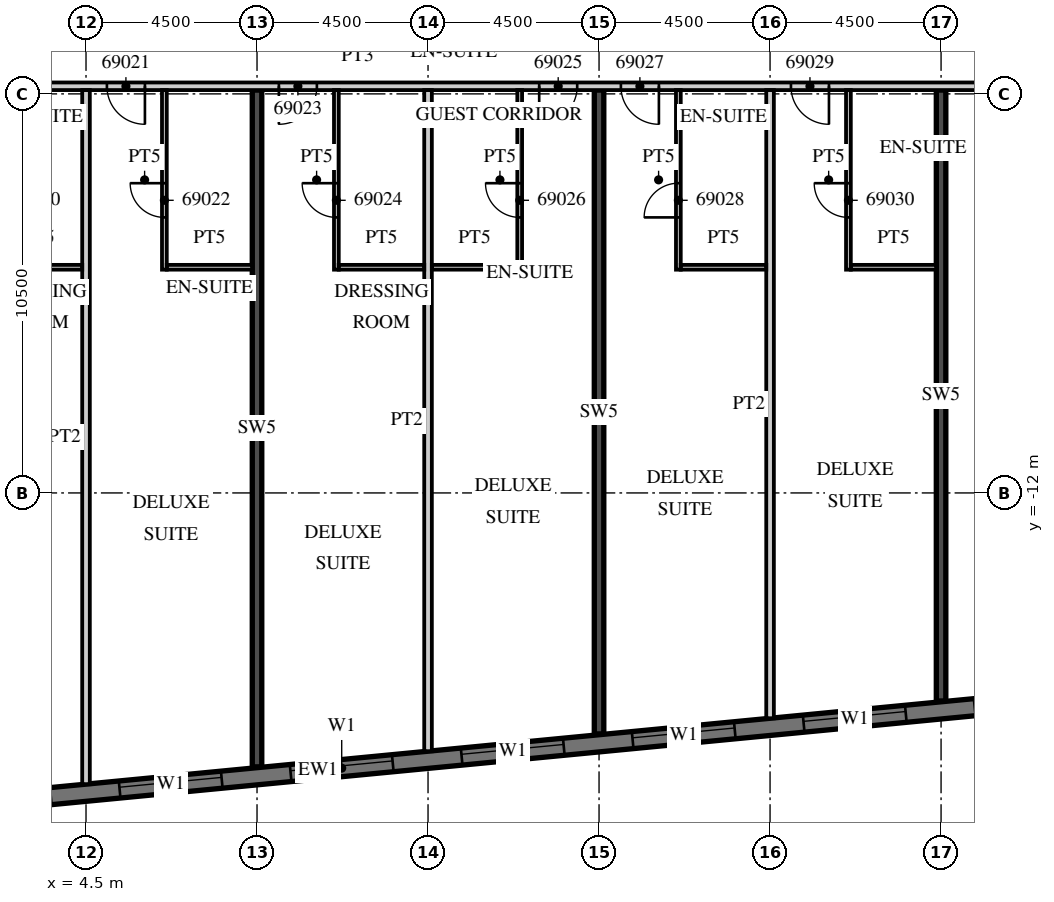
"""IFC4 building model, lengths in metres.
Left out: names, types, materials, properties, quantities, classifications, styles, units other than length and angle.
Written with IfcOpenShell. Run it as: python <this file> out.ifc"""

import sys

from ifc_helpers import new_model, si_unit, direction, frame, frame_2d, origin, place, context, subcontext, project, spatial, rectangle, extrude, element, fill, save


model = new_model("IFC4")
c1 = context("Model", 3, precision=1e-05, world=origin(), true_north=direction((0.0, 1.0)))
c2 = subcontext(c1, "Body", "Model", "MODEL_VIEW")
j1 = project(units=[si_unit("LENGTHUNIT", "METRE"), si_unit("PLANEANGLEUNIT", "RADIAN")], contexts=[c1])
p1 = place(None, origin())
s1 = spatial("IfcSite", under=j1, at=p1, CompositionType="ELEMENT")
p2 = place(p1, origin())
s2 = spatial("IfcBuilding", under=s1, at=p2, CompositionType="ELEMENT")
p3 = place(p2, frame((0.0, 0.0, 278.4)))
s3 = spatial("IfcBuildingStorey", under=s2, at=p3, CompositionType="ELEMENT", Elevation=278.4)
p4 = place(p3, frame((9.0, -19.207, 0.0), z_axis=(0.0, 0.0, 1.0), x_axis=(0.0, 1.0, 0.0)))
e1 = element("IfcWall", 1, at=p4, inside=s3, PredefinedType="SHEAR", context=c2, shape_type="SweptSolid", body=[
    extrude(rectangle(XDim=17.807, YDim=0.25, at=frame_2d((8.904, 0.0))), origin(), (0.0, 0.0, 1.0), 3.3),
])
p5 = place(p3, frame((18.0, -18.341, 0.0), z_axis=(0.0, 0.0, 1.0), x_axis=(0.0, 1.0, 0.0)))
e2 = element("IfcWall", 2, at=p5, inside=s3, PredefinedType="SHEAR", context=c2, shape_type="SweptSolid", body=[
    extrude(rectangle(XDim=16.941, YDim=0.25, at=frame_2d((8.47, 0.0))), origin(), (0.0, 0.0, 1.0), 3.3),
])
p6 = place(p3, frame((27.0, -17.474, 0.0), z_axis=(0.0, 0.0, 1.0), x_axis=(0.0, 1.0, 0.0)))
e3 = element("IfcWall", 3, at=p6, inside=s3, PredefinedType="SHEAR", context=c2, shape_type="SweptSolid", body=[
    extrude(rectangle(XDim=16.074, YDim=0.25, at=frame_2d((8.037, 0.0))), origin(), (0.0, 0.0, 1.0), 3.3),
])
p7 = place(p3, frame((-13.521, -21.624, 0.0), z_axis=(0.0, 0.0, 1.0), x_axis=(0.995396186218, 0.095845878695, 0.0)))
e4 = element("IfcWall", 4, at=p7, inside=s3, PredefinedType="SOLIDWALL", context=c2, shape_type="SweptSolid", body=[
    extrude(rectangle(XDim=48.481, YDim=0.45, at=frame_2d((24.241, 0.0))), origin(), (0.0, 0.0, 1.0), 3.02),
])
p8 = place(p7, frame((0.91, 0.0, 0.45)))
e5 = element("IfcOpeningElement", 5, at=p8, cuts=e4, PredefinedType="OPENING", context=c2, shape_type="SweptSolid", body=[
    extrude(rectangle(XDim=2.7, YDim=2.25, at=frame_2d((1.35, 1.125))), frame((0.0, 0.235, 0.0), z_axis=(0.0, -1.0, 0.0), x_axis=(1.0, 0.0, 0.0)), (0.0, 0.0, 1.0), 0.47),
])
p9 = place(p7, frame((5.431, 0.0, 0.45)))
e6 = element("IfcOpeningElement", 6, at=p9, cuts=e4, PredefinedType="OPENING", context=c2, shape_type="SweptSolid", body=[
    extrude(rectangle(XDim=2.7, YDim=2.25, at=frame_2d((1.35, 1.125))), frame((0.0, 0.235, 0.0), z_axis=(0.0, -1.0, 0.0), x_axis=(1.0, 0.0, 0.0)), (0.0, 0.0, 1.0), 0.47),
])
p10 = place(p7, frame((9.952, 0.0, 0.45)))
e7 = element("IfcOpeningElement", 7, at=p10, cuts=e4, PredefinedType="OPENING", context=c2, shape_type="SweptSolid", body=[
    extrude(rectangle(XDim=2.7, YDim=2.25, at=frame_2d((1.35, 1.125))), frame((0.0, 0.235, 0.0), z_axis=(0.0, -1.0, 0.0), x_axis=(1.0, 0.0, 0.0)), (0.0, 0.0, 1.0), 0.47),
])
p11 = place(p7, frame((14.473, 0.0, 0.45)))
e8 = element("IfcOpeningElement", 8, at=p11, cuts=e4, PredefinedType="OPENING", context=c2, shape_type="SweptSolid", body=[
    extrude(rectangle(XDim=2.7, YDim=2.25, at=frame_2d((1.35, 1.125))), frame((0.0, 0.235, 0.0), z_axis=(0.0, -1.0, 0.0), x_axis=(1.0, 0.0, 0.0)), (0.0, 0.0, 1.0), 0.47),
])
p12 = place(p7, frame((18.994, 0.0, 0.45)))
e9 = element("IfcOpeningElement", 9, at=p12, cuts=e4, PredefinedType="OPENING", context=c2, shape_type="SweptSolid", body=[
    extrude(rectangle(XDim=2.7, YDim=2.25, at=frame_2d((1.35, 1.125))), frame((0.0, 0.235, 0.0), z_axis=(0.0, -1.0, 0.0), x_axis=(1.0, 0.0, 0.0)), (0.0, 0.0, 1.0), 0.47),
])
p13 = place(p7, frame((23.514, 0.0, 0.45)))
e10 = element("IfcOpeningElement", 10, at=p13, cuts=e4, PredefinedType="OPENING", context=c2, shape_type="SweptSolid", body=[
    extrude(rectangle(XDim=2.7, YDim=2.25, at=frame_2d((1.35, 1.125))), frame((0.0, 0.235, 0.0), z_axis=(0.0, -1.0, 0.0), x_axis=(1.0, 0.0, 0.0)), (0.0, 0.0, 1.0), 0.47),
])
p14 = place(p7, frame((28.035, 0.0, 0.45)))
e11 = element("IfcOpeningElement", 11, at=p14, cuts=e4, PredefinedType="OPENING", context=c2, shape_type="SweptSolid", body=[
    extrude(rectangle(XDim=2.7, YDim=2.25, at=frame_2d((1.35, 1.125))), frame((0.0, 0.235, 0.0), z_axis=(0.0, -1.0, 0.0), x_axis=(1.0, 0.0, 0.0)), (0.0, 0.0, 1.0), 0.47),
])
p15 = place(p7, frame((32.556, 0.0, 0.45)))
e12 = element("IfcOpeningElement", 12, at=p15, cuts=e4, PredefinedType="OPENING", context=c2, shape_type="SweptSolid", body=[
    extrude(rectangle(XDim=2.7, YDim=2.25, at=frame_2d((1.35, 1.125))), frame((0.0, 0.235, 0.0), z_axis=(0.0, -1.0, 0.0), x_axis=(1.0, 0.0, 0.0)), (0.0, 0.0, 1.0), 0.47),
])
p16 = place(p7, frame((37.077, 0.0, 0.45)))
e13 = element("IfcOpeningElement", 13, at=p16, cuts=e4, PredefinedType="OPENING", context=c2, shape_type="SweptSolid", body=[
    extrude(rectangle(XDim=2.7, YDim=2.25, at=frame_2d((1.35, 1.125))), frame((0.0, 0.235, 0.0), z_axis=(0.0, -1.0, 0.0), x_axis=(1.0, 0.0, 0.0)), (0.0, 0.0, 1.0), 0.47),
])
p17 = place(p7, frame((41.598, 0.0, 0.45)))
e14 = element("IfcOpeningElement", 14, at=p17, cuts=e4, PredefinedType="OPENING", context=c2, shape_type="SweptSolid", body=[
    extrude(rectangle(XDim=2.7, YDim=2.25, at=frame_2d((1.35, 1.125))), frame((0.0, 0.235, 0.0), z_axis=(0.0, -1.0, 0.0), x_axis=(1.0, 0.0, 0.0)), (0.0, 0.0, 1.0), 0.47),
])
p18 = place(p3, frame((-13.5, -1.3, 0.0), z_axis=(0.0, 0.0, 1.0), x_axis=(1.0, 0.0, 0.0)))
e15 = element("IfcWall", 15, at=p18, inside=s3, PredefinedType="PARTITIONING", context=c2, shape_type="SweptSolid", body=[
    extrude(rectangle(XDim=50.293, YDim=0.2, at=frame_2d((25.146, 0.0))), origin(), (0.0, 0.0, 1.0), 3.02),
])
p19 = place(p18, frame((2.925, 0.0, 0.0)))
e16 = element("IfcOpeningElement", 16, at=p19, cuts=e15, PredefinedType="OPENING", context=c2, shape_type="SweptSolid", body=[
    extrude(rectangle(XDim=1.0, YDim=2.1, at=frame_2d((0.5, 1.05))), frame((0.0, 0.11, 0.0), z_axis=(0.0, -1.0, 0.0), x_axis=(1.0, 0.0, 0.0)), (0.0, 0.0, 1.0), 0.22),
])
p20 = place(p18, frame((6.938, 0.0, 0.0)))
e17 = element("IfcOpeningElement", 17, at=p20, cuts=e15, PredefinedType="OPENING", context=c2, shape_type="SweptSolid", body=[
    extrude(rectangle(XDim=1.2, YDim=2.1, at=frame_2d((0.6, 1.05))), frame((0.0, 0.11, 0.0), z_axis=(0.0, -1.0, 0.0), x_axis=(1.0, 0.0, 0.0)), (0.0, 0.0, 1.0), 0.22),
])
p21 = place(p18, frame((14.075, 0.0, 0.0)))
e18 = element("IfcOpeningElement", 18, at=p21, cuts=e15, PredefinedType="OPENING", context=c2, shape_type="SweptSolid", body=[
    extrude(rectangle(XDim=1.0, YDim=2.1, at=frame_2d((0.5, 1.05))), frame((0.0, 0.11, 0.0), z_axis=(0.0, -1.0, 0.0), x_axis=(1.0, 0.0, 0.0)), (0.0, 0.0, 1.0), 0.22),
])
p22 = place(p18, frame((18.55, 0.0, 0.0)))
e19 = element("IfcOpeningElement", 19, at=p22, cuts=e15, PredefinedType="OPENING", context=c2, shape_type="SweptSolid", body=[
    extrude(rectangle(XDim=1.0, YDim=2.1, at=frame_2d((0.5, 1.05))), frame((0.0, 0.11, 0.0), z_axis=(0.0, -1.0, 0.0), x_axis=(1.0, 0.0, 0.0)), (0.0, 0.0, 1.0), 0.22),
])
p23 = place(p18, frame((23.075, 0.0, 0.0)))
e20 = element("IfcOpeningElement", 20, at=p23, cuts=e15, PredefinedType="OPENING", context=c2, shape_type="SweptSolid", body=[
    extrude(rectangle(XDim=1.0, YDim=2.1, at=frame_2d((0.5, 1.05))), frame((0.0, 0.11, 0.0), z_axis=(0.0, -1.0, 0.0), x_axis=(1.0, 0.0, 0.0)), (0.0, 0.0, 1.0), 0.22),
])
p24 = place(p18, frame((29.925, 0.0, 0.0)))
e21 = element("IfcOpeningElement", 21, at=p24, cuts=e15, PredefinedType="OPENING", context=c2, shape_type="SweptSolid", body=[
    extrude(rectangle(XDim=1.0, YDim=2.1, at=frame_2d((0.5, 1.05))), frame((0.0, 0.11, 0.0), z_axis=(0.0, -1.0, 0.0), x_axis=(1.0, 0.0, 0.0)), (0.0, 0.0, 1.0), 0.22),
])
p25 = place(p18, frame((32.075, 0.0, 0.0)))
e22 = element("IfcOpeningElement", 22, at=p25, cuts=e15, PredefinedType="OPENING", context=c2, shape_type="SweptSolid", body=[
    extrude(rectangle(XDim=1.0, YDim=2.1, at=frame_2d((0.5, 1.05))), frame((0.0, 0.11, 0.0), z_axis=(0.0, -1.0, 0.0), x_axis=(1.0, 0.0, 0.0)), (0.0, 0.0, 1.0), 0.22),
])
p26 = place(p18, frame((36.55, 0.0, 0.0)))
e23 = element("IfcOpeningElement", 23, at=p26, cuts=e15, PredefinedType="OPENING", context=c2, shape_type="SweptSolid", body=[
    extrude(rectangle(XDim=1.0, YDim=2.1, at=frame_2d((0.5, 1.05))), frame((0.0, 0.11, 0.0), z_axis=(0.0, -1.0, 0.0), x_axis=(1.0, 0.0, 0.0)), (0.0, 0.0, 1.0), 0.22),
])
p27 = place(p18, frame((42.938, 0.0, 0.0)))
e24 = element("IfcOpeningElement", 24, at=p27, cuts=e15, PredefinedType="OPENING", context=c2, shape_type="SweptSolid", body=[
    extrude(rectangle(XDim=1.2, YDim=2.1, at=frame_2d((0.6, 1.05))), frame((0.0, 0.11, 0.0), z_axis=(0.0, -1.0, 0.0), x_axis=(1.0, 0.0, 0.0)), (0.0, 0.0, 1.0), 0.22),
])
p28 = place(p3, frame((4.5, -19.663, 0.0), z_axis=(0.0, 0.0, 1.0), x_axis=(0.0, 1.0, 0.0)))
e25 = element("IfcWall", 25, at=p28, inside=s3, PredefinedType="PARTITIONING", context=c2, shape_type="SweptSolid", body=[
    extrude(rectangle(XDim=18.263, YDim=0.2, at=frame_2d((9.132, 0.0))), origin(), (0.0, 0.0, 1.0), 3.02),
])
p29 = place(p3, frame((2.15, -6.062, 0.0), z_axis=(0.0, 0.0, 1.0), x_axis=(1.0, 0.0, 0.0)))
e26 = element("IfcWall", 26, at=p29, inside=s3, PredefinedType="PARTITIONING", context=c2, shape_type="SweptSolid", body=[
    extrude(rectangle(XDim=2.25, YDim=0.125, at=frame_2d((1.125, 0.0))), origin(), (0.0, 0.0, 1.0), 3.02),
])
p30 = place(p3, frame((6.562, -6.125, 0.0), z_axis=(0.0, 0.0, 1.0), x_axis=(0.0, 1.0, 0.0)))
e27 = element("IfcWall", 27, at=p30, inside=s3, PredefinedType="PARTITIONING", context=c2, shape_type="SweptSolid", body=[
    extrude(rectangle(XDim=4.725, YDim=0.125, at=frame_2d((2.363, 0.0))), origin(), (0.0, 0.0, 1.0), 3.02),
])
p31 = place(p30, frame((1.375, 0.0, 0.0)))
e28 = element("IfcOpeningElement", 28, at=p31, cuts=e27, PredefinedType="OPENING", context=c2, shape_type="SweptSolid", body=[
    extrude(rectangle(XDim=0.9, YDim=2.1, at=frame_2d((0.45, 1.05))), frame((0.0, 0.073, 0.0), z_axis=(0.0, -1.0, 0.0), x_axis=(1.0, 0.0, 0.0)), (0.0, 0.0, 1.0), 0.145),
])
p32 = place(p3, frame((6.625, -6.062, 0.0), z_axis=(0.0, 0.0, 1.0), x_axis=(1.0, 0.0, 0.0)))
e29 = element("IfcWall", 29, at=p32, inside=s3, PredefinedType="PARTITIONING", context=c2, shape_type="SweptSolid", body=[
    extrude(rectangle(XDim=2.25, YDim=0.125, at=frame_2d((1.125, 0.0))), origin(), (0.0, 0.0, 1.0), 3.02),
])
p33 = place(p3, frame((13.5, -18.796, 0.0), z_axis=(0.0, 0.0, 1.0), x_axis=(0.0, 1.0, 0.0)))
e30 = element("IfcWall", 30, at=p33, inside=s3, PredefinedType="PARTITIONING", context=c2, shape_type="SweptSolid", body=[
    extrude(rectangle(XDim=17.396, YDim=0.2, at=frame_2d((8.698, 0.0))), origin(), (0.0, 0.0, 1.0), 3.02),
])
p34 = place(p3, frame((11.088, -6.125, 0.0), z_axis=(0.0, 0.0, 1.0), x_axis=(0.0, 1.0, 0.0)))
e31 = element("IfcWall", 31, at=p34, inside=s3, PredefinedType="PARTITIONING", context=c2, shape_type="SweptSolid", body=[
    extrude(rectangle(XDim=4.725, YDim=0.125, at=frame_2d((2.363, 0.0))), origin(), (0.0, 0.0, 1.0), 3.02),
])
p35 = place(p34, frame((1.375, 0.0, 0.0)))
e32 = element("IfcOpeningElement", 32, at=p35, cuts=e31, PredefinedType="OPENING", context=c2, shape_type="SweptSolid", body=[
    extrude(rectangle(XDim=0.9, YDim=2.1, at=frame_2d((0.45, 1.05))), frame((0.0, 0.073, 0.0), z_axis=(0.0, -1.0, 0.0), x_axis=(1.0, 0.0, 0.0)), (0.0, 0.0, 1.0), 0.145),
])
p36 = place(p3, frame((11.15, -6.062, 0.0), z_axis=(0.0, 0.0, 1.0), x_axis=(1.0, 0.0, 0.0)))
e33 = element("IfcWall", 33, at=p36, inside=s3, PredefinedType="PARTITIONING", context=c2, shape_type="SweptSolid", body=[
    extrude(rectangle(XDim=2.25, YDim=0.125, at=frame_2d((1.125, 0.0))), origin(), (0.0, 0.0, 1.0), 3.02),
])
p37 = place(p3, frame((15.912, -6.125, 0.0), z_axis=(0.0, 0.0, 1.0), x_axis=(0.0, 1.0, 0.0)))
e34 = element("IfcWall", 34, at=p37, inside=s3, PredefinedType="PARTITIONING", context=c2, shape_type="SweptSolid", body=[
    extrude(rectangle(XDim=4.725, YDim=0.125, at=frame_2d((2.363, 0.0))), origin(), (0.0, 0.0, 1.0), 3.02),
])
p38 = place(p37, frame((1.375, 0.0, 0.0)))
e35 = element("IfcOpeningElement", 35, at=p38, cuts=e34, PredefinedType="OPENING", context=c2, shape_type="SweptSolid", body=[
    extrude(rectangle(XDim=0.9, YDim=2.1, at=frame_2d((0.45, 1.05))), frame((0.0, 0.073, 0.0), z_axis=(0.0, -1.0, 0.0), x_axis=(1.0, 0.0, 0.0)), (0.0, 0.0, 1.0), 0.145),
])
p39 = place(p3, frame((13.6, -6.062, 0.0), z_axis=(0.0, 0.0, 1.0), x_axis=(1.0, 0.0, 0.0)))
e36 = element("IfcWall", 36, at=p39, inside=s3, PredefinedType="PARTITIONING", context=c2, shape_type="SweptSolid", body=[
    extrude(rectangle(XDim=2.25, YDim=0.125, at=frame_2d((1.125, 0.0))), origin(), (0.0, 0.0, 1.0), 3.02),
])
p40 = place(p3, frame((22.5, -17.929, 0.0), z_axis=(0.0, 0.0, 1.0), x_axis=(0.0, 1.0, 0.0)))
e37 = element("IfcWall", 37, at=p40, inside=s3, PredefinedType="PARTITIONING", context=c2, shape_type="SweptSolid", body=[
    extrude(rectangle(XDim=16.529, YDim=0.2, at=frame_2d((8.265, 0.0))), origin(), (0.0, 0.0, 1.0), 3.02),
])
p41 = place(p3, frame((20.087, -6.125, 0.0), z_axis=(0.0, 0.0, 1.0), x_axis=(0.0, 1.0, 0.0)))
e38 = element("IfcWall", 38, at=p41, inside=s3, PredefinedType="PARTITIONING", context=c2, shape_type="SweptSolid", body=[
    extrude(rectangle(XDim=4.725, YDim=0.125, at=frame_2d((2.363, 0.0))), origin(), (0.0, 0.0, 1.0), 3.02),
])
p42 = place(p41, frame((1.375, 0.0, 0.0)))
e39 = element("IfcOpeningElement", 39, at=p42, cuts=e38, PredefinedType="OPENING", context=c2, shape_type="SweptSolid", body=[
    extrude(rectangle(XDim=0.9, YDim=2.1, at=frame_2d((0.45, 1.05))), frame((0.0, 0.073, 0.0), z_axis=(0.0, -1.0, 0.0), x_axis=(1.0, 0.0, 0.0)), (0.0, 0.0, 1.0), 0.145),
])
p43 = place(p3, frame((20.15, -6.062, 0.0), z_axis=(0.0, 0.0, 1.0), x_axis=(1.0, 0.0, 0.0)))
e40 = element("IfcWall", 40, at=p43, inside=s3, PredefinedType="PARTITIONING", context=c2, shape_type="SweptSolid", body=[
    extrude(rectangle(XDim=2.25, YDim=0.125, at=frame_2d((1.125, 0.0))), origin(), (0.0, 0.0, 1.0), 3.02),
])
p44 = place(p3, frame((24.562, -6.125, 0.0), z_axis=(0.0, 0.0, 1.0), x_axis=(0.0, 1.0, 0.0)))
e41 = element("IfcWall", 41, at=p44, inside=s3, PredefinedType="PARTITIONING", context=c2, shape_type="SweptSolid", body=[
    extrude(rectangle(XDim=4.725, YDim=0.125, at=frame_2d((2.363, 0.0))), origin(), (0.0, 0.0, 1.0), 3.02),
])
p45 = place(p44, frame((1.375, 0.0, 0.0)))
e42 = element("IfcOpeningElement", 42, at=p45, cuts=e41, PredefinedType="OPENING", context=c2, shape_type="SweptSolid", body=[
    extrude(rectangle(XDim=0.9, YDim=2.1, at=frame_2d((0.45, 1.05))), frame((0.0, 0.073, 0.0), z_axis=(0.0, -1.0, 0.0), x_axis=(1.0, 0.0, 0.0)), (0.0, 0.0, 1.0), 0.145),
])
p46 = place(p3, frame((24.625, -6.062, 0.0), z_axis=(0.0, 0.0, 1.0), x_axis=(1.0, 0.0, 0.0)))
e43 = element("IfcWall", 43, at=p46, inside=s3, PredefinedType="PARTITIONING", context=c2, shape_type="SweptSolid", body=[
    extrude(rectangle(XDim=2.25, YDim=0.125, at=frame_2d((1.125, 0.0))), origin(), (0.0, 0.0, 1.0), 3.02),
])
p47 = place(p12, origin())
e44 = element("IfcWindow", 44, at=p47, inside=s3, PartitioningType="SINGLE_PANEL", PredefinedType="WINDOW", context=c2, shape_type="SweptSolid", body=[
    extrude(rectangle(XDim=2.7, YDim=2.25, at=frame_2d((1.35, 1.125))), frame((0.0, 0.09, 0.0), z_axis=(0.0, -1.0, 0.0), x_axis=(1.0, 0.0, 0.0)), (0.0, 0.0, 1.0), 0.06),
])
fill(e9, e44)
p48 = place(p13, origin())
e45 = element("IfcWindow", 45, at=p48, inside=s3, PartitioningType="SINGLE_PANEL", PredefinedType="WINDOW", context=c2, shape_type="SweptSolid", body=[
    extrude(rectangle(XDim=2.7, YDim=2.25, at=frame_2d((1.35, 1.125))), frame((0.0, 0.09, 0.0), z_axis=(0.0, -1.0, 0.0), x_axis=(1.0, 0.0, 0.0)), (0.0, 0.0, 1.0), 0.06),
])
fill(e10, e45)
p49 = place(p14, origin())
e46 = element("IfcWindow", 46, at=p49, inside=s3, PartitioningType="SINGLE_PANEL", PredefinedType="WINDOW", context=c2, shape_type="SweptSolid", body=[
    extrude(rectangle(XDim=2.7, YDim=2.25, at=frame_2d((1.35, 1.125))), frame((0.0, 0.09, 0.0), z_axis=(0.0, -1.0, 0.0), x_axis=(1.0, 0.0, 0.0)), (0.0, 0.0, 1.0), 0.06),
])
fill(e11, e46)
p50 = place(p15, origin())
e47 = element("IfcWindow", 47, at=p50, inside=s3, PartitioningType="SINGLE_PANEL", PredefinedType="WINDOW", context=c2, shape_type="SweptSolid", body=[
    extrude(rectangle(XDim=2.7, YDim=2.25, at=frame_2d((1.35, 1.125))), frame((0.0, 0.09, 0.0), z_axis=(0.0, -1.0, 0.0), x_axis=(1.0, 0.0, 0.0)), (0.0, 0.0, 1.0), 0.06),
])
fill(e12, e47)
p51 = place(p16, origin())
e48 = element("IfcWindow", 48, at=p51, inside=s3, PartitioningType="SINGLE_PANEL", PredefinedType="WINDOW", context=c2, shape_type="SweptSolid", body=[
    extrude(rectangle(XDim=2.7, YDim=2.25, at=frame_2d((1.35, 1.125))), frame((0.0, 0.09, 0.0), z_axis=(0.0, -1.0, 0.0), x_axis=(1.0, 0.0, 0.0)), (0.0, 0.0, 1.0), 0.06),
])
fill(e13, e48)
p52 = place(p22, origin())
e49 = element("IfcDoor", 49, at=p52, inside=s3, OperationType="SINGLE_SWING_RIGHT", PredefinedType="DOOR", context=c2, shape_type="SweptSolid", body=[
    extrude(rectangle(XDim=1.0, YDim=2.1, at=frame_2d((0.5, 1.05))), frame((0.0, 0.025, 0.0), z_axis=(0.0, -1.0, 0.0), x_axis=(1.0, 0.0, 0.0)), (0.0, 0.0, 1.0), 0.05),
])
fill(e19, e49)
p53 = place(p31, origin())
e50 = element("IfcDoor", 50, at=p53, inside=s3, OperationType="SINGLE_SWING_RIGHT", PredefinedType="DOOR", context=c2, shape_type="SweptSolid", body=[
    extrude(rectangle(XDim=0.9, YDim=2.1, at=frame_2d((0.45, 1.05))), frame((0.0, 0.025, 0.0), z_axis=(0.0, -1.0, 0.0), x_axis=(1.0, 0.0, 0.0)), (0.0, 0.0, 1.0), 0.05),
])
fill(e28, e50)
p54 = place(p23, origin())
e51 = element("IfcDoor", 51, at=p54, inside=s3, OperationType="SINGLE_SWING_LEFT", PredefinedType="DOOR", context=c2, shape_type="SweptSolid", body=[
    extrude(rectangle(XDim=1.0, YDim=2.1, at=frame_2d((0.5, 1.05))), frame((0.0, 0.025, 0.0), z_axis=(0.0, -1.0, 0.0), x_axis=(1.0, 0.0, 0.0)), (0.0, 0.0, 1.0), 0.05),
])
fill(e20, e51)
p55 = place(p35, origin())
e52 = element("IfcDoor", 52, at=p55, inside=s3, OperationType="SINGLE_SWING_RIGHT", PredefinedType="DOOR", context=c2, shape_type="SweptSolid", body=[
    extrude(rectangle(XDim=0.9, YDim=2.1, at=frame_2d((0.45, 1.05))), frame((0.0, 0.025, 0.0), z_axis=(0.0, -1.0, 0.0), x_axis=(1.0, 0.0, 0.0)), (0.0, 0.0, 1.0), 0.05),
])
fill(e32, e52)
p56 = place(p24, origin())
e53 = element("IfcDoor", 53, at=p56, inside=s3, OperationType="SINGLE_SWING_LEFT", PredefinedType="DOOR", context=c2, shape_type="SweptSolid", body=[
    extrude(rectangle(XDim=1.0, YDim=2.1, at=frame_2d((0.5, 1.05))), frame((0.0, 0.025, 0.0), z_axis=(0.0, -1.0, 0.0), x_axis=(1.0, 0.0, 0.0)), (0.0, 0.0, 1.0), 0.05),
])
fill(e21, e53)
p57 = place(p38, origin())
e54 = element("IfcDoor", 54, at=p57, inside=s3, OperationType="SINGLE_SWING_RIGHT", PredefinedType="DOOR", context=c2, shape_type="SweptSolid", body=[
    extrude(rectangle(XDim=0.9, YDim=2.1, at=frame_2d((0.45, 1.05))), frame((0.0, 0.025, 0.0), z_axis=(0.0, -1.0, 0.0), x_axis=(1.0, 0.0, 0.0)), (0.0, 0.0, 1.0), 0.05),
])
fill(e35, e54)
p58 = place(p25, origin())
e55 = element("IfcDoor", 55, at=p58, inside=s3, OperationType="SINGLE_SWING_RIGHT", PredefinedType="DOOR", context=c2, shape_type="SweptSolid", body=[
    extrude(rectangle(XDim=1.0, YDim=2.1, at=frame_2d((0.5, 1.05))), frame((0.0, 0.025, 0.0), z_axis=(0.0, -1.0, 0.0), x_axis=(1.0, 0.0, 0.0)), (0.0, 0.0, 1.0), 0.05),
])
fill(e22, e55)
p59 = place(p42, origin())
e56 = element("IfcDoor", 56, at=p59, inside=s3, OperationType="SINGLE_SWING_LEFT", PredefinedType="DOOR", context=c2, shape_type="SweptSolid", body=[
    extrude(rectangle(XDim=0.9, YDim=2.1, at=frame_2d((0.45, 1.05))), frame((0.0, 0.025, 0.0), z_axis=(0.0, -1.0, 0.0), x_axis=(1.0, 0.0, 0.0)), (0.0, 0.0, 1.0), 0.05),
])
fill(e39, e56)
p60 = place(p26, origin())
e57 = element("IfcDoor", 57, at=p60, inside=s3, OperationType="SINGLE_SWING_RIGHT", PredefinedType="DOOR", context=c2, shape_type="SweptSolid", body=[
    extrude(rectangle(XDim=1.0, YDim=2.1, at=frame_2d((0.5, 1.05))), frame((0.0, 0.025, 0.0), z_axis=(0.0, -1.0, 0.0), x_axis=(1.0, 0.0, 0.0)), (0.0, 0.0, 1.0), 0.05),
])
fill(e23, e57)
p61 = place(p45, origin())
e58 = element("IfcDoor", 58, at=p61, inside=s3, OperationType="SINGLE_SWING_RIGHT", PredefinedType="DOOR", context=c2, shape_type="SweptSolid", body=[
    extrude(rectangle(XDim=0.9, YDim=2.1, at=frame_2d((0.45, 1.05))), frame((0.0, 0.025, 0.0), z_axis=(0.0, -1.0, 0.0), x_axis=(1.0, 0.0, 0.0)), (0.0, 0.0, 1.0), 0.05),
])
fill(e42, e58)
save(model, sys.argv[1])
